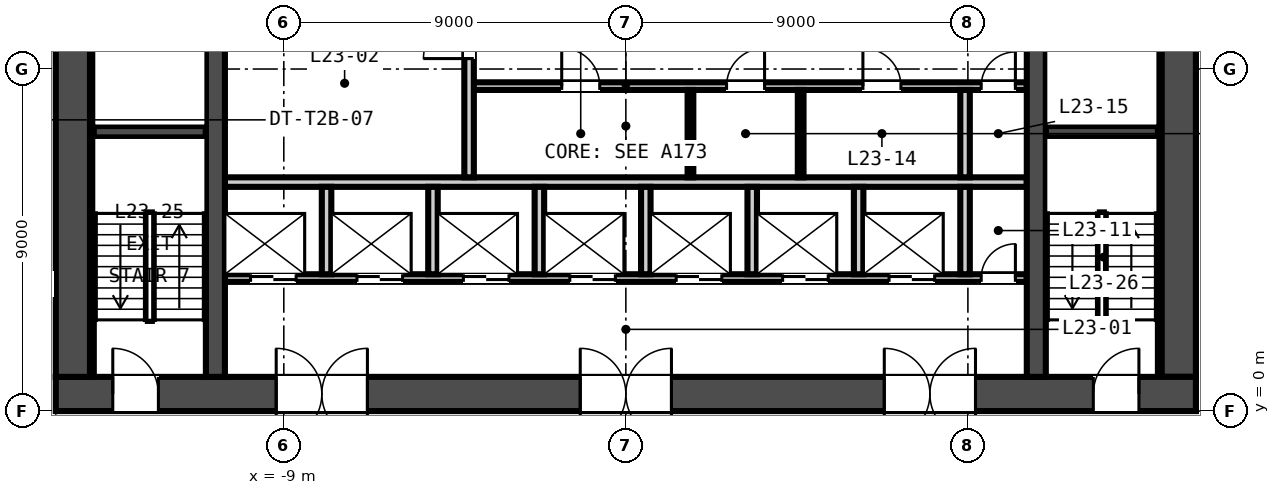
"""IFC4 building model, lengths in metres.
Left out: names, types, materials, properties, quantities, classifications, styles, units other than length and angle.
Written with IfcOpenShell. Run it as: python <this file> out.ifc"""

import sys

from ifc_helpers import new_model, si_unit, direction, frame, frame_2d, origin, place, context, subcontext, project, spatial, rectangle, extrude, element, fill, save


model = new_model("IFC4")
c1 = context("Model", 3, precision=1e-05, world=origin(), true_north=direction((0.0, 1.0)))
c2 = subcontext(c1, "Body", "Model", "MODEL_VIEW")
j1 = project(units=[si_unit("LENGTHUNIT", "METRE"), si_unit("PLANEANGLEUNIT", "RADIAN")], contexts=[c1])
p1 = place(None, origin())
s1 = spatial("IfcSite", under=j1, at=p1, CompositionType="ELEMENT")
p2 = place(p1, origin())
s2 = spatial("IfcBuilding", under=s1, at=p2, CompositionType="ELEMENT")
p3 = place(p2, frame((0.0, 0.0, 98.9)))
s3 = spatial("IfcBuildingStorey", under=s2, at=p3, CompositionType="ELEMENT", Elevation=98.9)
p4 = place(p3, frame((-15.0, 0.45, -0.15), z_axis=(0.0, 0.0, 1.0), x_axis=(1.0, 0.0, 0.0)))
e1 = element("IfcWall", 1, at=p4, inside=s3, PredefinedType="SOLIDWALL", context=c2, shape_type="SweptSolid", body=[
    extrude(rectangle(XDim=30.0, YDim=0.9, at=frame_2d((15.0, 0.0))), origin(), (0.0, 0.0, 1.0), 3.65),
])
p5 = place(p4, frame((5.8, 0.0, 0.15)))
e2 = element("IfcOpeningElement", 2, at=p5, cuts=e1, PredefinedType="OPENING", context=c2, shape_type="SweptSolid", body=[
    extrude(rectangle(XDim=2.4, YDim=2.4, at=frame_2d((1.2, 1.2))), frame((0.0, 0.46, 0.0), z_axis=(0.0, -1.0, 0.0), x_axis=(1.0, 0.0, 0.0)), (0.0, 0.0, 1.0), 0.92),
])
p6 = place(p4, frame((13.8, 0.0, 0.15)))
e3 = element("IfcOpeningElement", 3, at=p6, cuts=e1, PredefinedType="OPENING", context=c2, shape_type="SweptSolid", body=[
    extrude(rectangle(XDim=2.4, YDim=2.4, at=frame_2d((1.2, 1.2))), frame((0.0, 0.46, 0.0), z_axis=(0.0, -1.0, 0.0), x_axis=(1.0, 0.0, 0.0)), (0.0, 0.0, 1.0), 0.92),
])
p7 = place(p4, frame((21.8, 0.0, 0.15)))
e4 = element("IfcOpeningElement", 4, at=p7, cuts=e1, PredefinedType="OPENING", context=c2, shape_type="SweptSolid", body=[
    extrude(rectangle(XDim=2.4, YDim=2.4, at=frame_2d((1.2, 1.2))), frame((0.0, 0.46, 0.0), z_axis=(0.0, -1.0, 0.0), x_axis=(1.0, 0.0, 0.0)), (0.0, 0.0, 1.0), 0.92),
])
p8 = place(p4, frame((1.5, 0.0, 0.15)))
e5 = element("IfcOpeningElement", 5, at=p8, cuts=e1, PredefinedType="OPENING", context=c2, shape_type="SweptSolid", body=[
    extrude(rectangle(XDim=1.2, YDim=2.1, at=frame_2d((0.6, 1.05))), frame((0.0, 0.46, 0.0), z_axis=(0.0, -1.0, 0.0), x_axis=(1.0, 0.0, 0.0)), (0.0, 0.0, 1.0), 0.92),
])
p9 = place(p4, frame((27.3, 0.0, 0.15)))
e6 = element("IfcOpeningElement", 6, at=p9, cuts=e1, PredefinedType="OPENING", context=c2, shape_type="SweptSolid", body=[
    extrude(rectangle(XDim=1.2, YDim=2.1, at=frame_2d((0.6, 1.05))), frame((0.0, 0.46, 0.0), z_axis=(0.0, -1.0, 0.0), x_axis=(1.0, 0.0, 0.0)), (0.0, 0.0, 1.0), 0.92),
])
for number, where, z_axis, x_axis in (
    (7, (-14.55, 0.9, -0.15), (0.0, 0.0, 1.0), (0.0, 1.0, 0.0)),
    (8, (14.55, 0.9, -0.15), (0.0, 0.0, 1.0), (0.0, 1.0, 0.0)),
):
    element("IfcWall", number, at=place(p3, frame(where, z_axis=z_axis, x_axis=x_axis)), inside=s3, PredefinedType="SOLIDWALL", context=c2, shape_type="SweptSolid", body=[
        extrude(rectangle(XDim=13.2, YDim=0.9, at=frame_2d((6.6, 0.0))), origin(), (0.0, 0.0, 1.0), 3.65),
    ])
for number, where, z_axis, x_axis in (
    (9, (-10.8, 0.9, -0.15), (0.0, 0.0, 1.0), (0.0, 1.0, 0.0)),
    (10, (10.8, 0.9, -0.15), (0.0, 0.0, 1.0), (0.0, 1.0, 0.0)),
):
    element("IfcWall", number, at=place(p3, frame(where, z_axis=z_axis, x_axis=x_axis)), inside=s3, PredefinedType="SOLIDWALL", context=c2, shape_type="SweptSolid", body=[
        extrude(rectangle(XDim=13.2, YDim=0.5, at=frame_2d((6.6, 0.0))), origin(), (0.0, 0.0, 1.0), 3.65),
    ])
p10 = place(p3, frame((-10.55, 3.5, 0.0), z_axis=(0.0, 0.0, 1.0), x_axis=(1.0, 0.0, 0.0)))
e11 = element("IfcWall", 11, at=p10, inside=s3, PredefinedType="PARTITIONING", context=c2, shape_type="SweptSolid", body=[
    extrude(rectangle(XDim=21.1, YDim=0.2, at=frame_2d((10.55, 0.0))), origin(), (0.0, 0.0, 1.0), 3.5),
])
p11 = place(p10, frame((0.675, 0.0, 0.0)))
e12 = element("IfcOpeningElement", 12, at=p11, cuts=e11, PredefinedType="OPENING", context=c2, shape_type="SweptSolid", body=[
    extrude(rectangle(XDim=1.2, YDim=2.1, at=frame_2d((0.6, 1.05))), frame((0.0, 0.11, 0.0), z_axis=(0.0, -1.0, 0.0), x_axis=(1.0, 0.0, 0.0)), (0.0, 0.0, 1.0), 0.22),
])
p12 = place(p10, frame((3.475, 0.0, 0.0)))
e13 = element("IfcOpeningElement", 13, at=p12, cuts=e11, PredefinedType="OPENING", context=c2, shape_type="SweptSolid", body=[
    extrude(rectangle(XDim=1.2, YDim=2.1, at=frame_2d((0.6, 1.05))), frame((0.0, 0.11, 0.0), z_axis=(0.0, -1.0, 0.0), x_axis=(1.0, 0.0, 0.0)), (0.0, 0.0, 1.0), 0.22),
])
p13 = place(p10, frame((6.275, 0.0, 0.0)))
e14 = element("IfcOpeningElement", 14, at=p13, cuts=e11, PredefinedType="OPENING", context=c2, shape_type="SweptSolid", body=[
    extrude(rectangle(XDim=1.2, YDim=2.1, at=frame_2d((0.6, 1.05))), frame((0.0, 0.11, 0.0), z_axis=(0.0, -1.0, 0.0), x_axis=(1.0, 0.0, 0.0)), (0.0, 0.0, 1.0), 0.22),
])
p14 = place(p10, frame((9.075, 0.0, 0.0)))
e15 = element("IfcOpeningElement", 15, at=p14, cuts=e11, PredefinedType="OPENING", context=c2, shape_type="SweptSolid", body=[
    extrude(rectangle(XDim=1.2, YDim=2.1, at=frame_2d((0.6, 1.05))), frame((0.0, 0.11, 0.0), z_axis=(0.0, -1.0, 0.0), x_axis=(1.0, 0.0, 0.0)), (0.0, 0.0, 1.0), 0.22),
])
p15 = place(p10, frame((11.875, 0.0, 0.0)))
e16 = element("IfcOpeningElement", 16, at=p15, cuts=e11, PredefinedType="OPENING", context=c2, shape_type="SweptSolid", body=[
    extrude(rectangle(XDim=1.2, YDim=2.1, at=frame_2d((0.6, 1.05))), frame((0.0, 0.11, 0.0), z_axis=(0.0, -1.0, 0.0), x_axis=(1.0, 0.0, 0.0)), (0.0, 0.0, 1.0), 0.22),
])
p16 = place(p10, frame((14.675, 0.0, 0.0)))
e17 = element("IfcOpeningElement", 17, at=p16, cuts=e11, PredefinedType="OPENING", context=c2, shape_type="SweptSolid", body=[
    extrude(rectangle(XDim=1.2, YDim=2.1, at=frame_2d((0.6, 1.05))), frame((0.0, 0.11, 0.0), z_axis=(0.0, -1.0, 0.0), x_axis=(1.0, 0.0, 0.0)), (0.0, 0.0, 1.0), 0.22),
])
p17 = place(p10, frame((17.475, 0.0, 0.0)))
e18 = element("IfcOpeningElement", 18, at=p17, cuts=e11, PredefinedType="OPENING", context=c2, shape_type="SweptSolid", body=[
    extrude(rectangle(XDim=1.2, YDim=2.1, at=frame_2d((0.6, 1.05))), frame((0.0, 0.11, 0.0), z_axis=(0.0, -1.0, 0.0), x_axis=(1.0, 0.0, 0.0)), (0.0, 0.0, 1.0), 0.22),
])
p18 = place(p10, frame((19.9, 0.0, 0.0)))
e19 = element("IfcOpeningElement", 19, at=p18, cuts=e11, PredefinedType="OPENING", context=c2, shape_type="SweptSolid", body=[
    extrude(rectangle(XDim=0.9, YDim=2.1, at=frame_2d((0.45, 1.05))), frame((0.0, 0.11, 0.0), z_axis=(0.0, -1.0, 0.0), x_axis=(1.0, 0.0, 0.0)), (0.0, 0.0, 1.0), 0.22),
])
p19 = place(p3, frame((-10.55, 6.025, 0.0), z_axis=(0.0, 0.0, 1.0), x_axis=(1.0, 0.0, 0.0)))
e20 = element("IfcWall", 20, at=p19, inside=s3, PredefinedType="PARTITIONING", context=c2, shape_type="SweptSolid", body=[
    extrude(rectangle(XDim=21.1, YDim=0.25, at=frame_2d((10.55, 0.0))), origin(), (0.0, 0.0, 1.0), 3.5),
])
p20 = place(p3, frame((-4.125, 8.55, 0.0), z_axis=(0.0, 0.0, 1.0), x_axis=(1.0, 0.0, 0.0)))
e21 = element("IfcWall", 21, at=p20, inside=s3, PredefinedType="PARTITIONING", context=c2, shape_type="SweptSolid", body=[
    extrude(rectangle(XDim=14.675, YDim=0.2, at=frame_2d((7.337, 0.0))), origin(), (0.0, 0.0, 1.0), 3.5),
])
p21 = place(p20, frame((2.438, 0.0, 0.0)))
e22 = element("IfcOpeningElement", 22, at=p21, cuts=e21, PredefinedType="OPENING", context=c2, shape_type="SweptSolid", body=[
    extrude(rectangle(XDim=1.0, YDim=2.1, at=frame_2d((0.5, 1.05))), frame((0.0, 0.11, 0.0), z_axis=(0.0, -1.0, 0.0), x_axis=(1.0, 0.0, 0.0)), (0.0, 0.0, 1.0), 0.22),
])
p22 = place(p20, frame((6.775, 0.0, 0.0)))
e23 = element("IfcOpeningElement", 23, at=p22, cuts=e21, PredefinedType="OPENING", context=c2, shape_type="SweptSolid", body=[
    extrude(rectangle(XDim=1.0, YDim=2.1, at=frame_2d((0.5, 1.05))), frame((0.0, 0.11, 0.0), z_axis=(0.0, -1.0, 0.0), x_axis=(1.0, 0.0, 0.0)), (0.0, 0.0, 1.0), 0.22),
])
p23 = place(p20, frame((10.363, 0.0, 0.0)))
e24 = element("IfcOpeningElement", 24, at=p23, cuts=e21, PredefinedType="OPENING", context=c2, shape_type="SweptSolid", body=[
    extrude(rectangle(XDim=1.0, YDim=2.1, at=frame_2d((0.5, 1.05))), frame((0.0, 0.11, 0.0), z_axis=(0.0, -1.0, 0.0), x_axis=(1.0, 0.0, 0.0)), (0.0, 0.0, 1.0), 0.22),
])
p24 = place(p20, frame((13.475, 0.0, 0.0)))
e25 = element("IfcOpeningElement", 25, at=p24, cuts=e21, PredefinedType="OPENING", context=c2, shape_type="SweptSolid", body=[
    extrude(rectangle(XDim=0.9, YDim=2.1, at=frame_2d((0.45, 1.05))), frame((0.0, 0.11, 0.0), z_axis=(0.0, -1.0, 0.0), x_axis=(1.0, 0.0, 0.0)), (0.0, 0.0, 1.0), 0.22),
])
p25 = place(p3, frame((-4.125, 6.15, 0.0), z_axis=(0.0, 0.0, 1.0), x_axis=(0.0, 1.0, 0.0)))
e26 = element("IfcWall", 26, at=p25, inside=s3, PredefinedType="PARTITIONING", context=c2, shape_type="SweptSolid", body=[
    extrude(rectangle(XDim=4.95, YDim=0.25, at=frame_2d((2.475, 0.0))), origin(), (0.0, 0.0, 1.0), 3.5),
])
p26 = place(p25, frame((3.125, 0.0, 0.0)))
e27 = element("IfcOpeningElement", 27, at=p26, cuts=e26, PredefinedType="OPENING", context=c2, shape_type="SweptSolid", body=[
    extrude(rectangle(XDim=1.2, YDim=2.1, at=frame_2d((0.6, 1.05))), frame((0.0, 0.135, 0.0), z_axis=(0.0, -1.0, 0.0), x_axis=(1.0, 0.0, 0.0)), (0.0, 0.0, 1.0), 0.27),
])
for number, where, z_axis, x_axis in (
    (28, (-7.875, 3.6, 0.0), (0.0, 0.0, 1.0), (0.0, 1.0, 0.0)),
    (29, (-5.075, 3.6, 0.0), (0.0, 0.0, 1.0), (0.0, 1.0, 0.0)),
    (30, (-2.275, 3.6, 0.0), (0.0, 0.0, 1.0), (0.0, 1.0, 0.0)),
    (31, (0.525, 3.6, 0.0), (0.0, 0.0, 1.0), (0.0, 1.0, 0.0)),
    (32, (3.325, 3.6, 0.0), (0.0, 0.0, 1.0), (0.0, 1.0, 0.0)),
    (33, (6.125, 3.6, 0.0), (0.0, 0.0, 1.0), (0.0, 1.0, 0.0)),
    (34, (8.925, 3.6, 0.0), (0.0, 0.0, 1.0), (0.0, 1.0, 0.0)),
):
    element("IfcWall", number, at=place(p3, frame(where, z_axis=z_axis, x_axis=x_axis)), inside=s3, PredefinedType="PARTITIONING", context=c2, shape_type="SweptSolid", body=[
        extrude(rectangle(XDim=2.3, YDim=0.25, at=frame_2d((1.15, 0.0))), origin(), (0.0, 0.0, 1.0), 3.5),
    ])
for number, where, z_axis, x_axis in (
    (35, (1.7, 6.15, 0.0), (0.0, 0.0, 1.0), (0.0, 1.0, 0.0)),
    (36, (4.6, 6.15, 0.0), (0.0, 0.0, 1.0), (0.0, 1.0, 0.0)),
):
    element("IfcWall", number, at=place(p3, frame(where, z_axis=z_axis, x_axis=x_axis)), inside=s3, PredefinedType="PARTITIONING", context=c2, shape_type="SweptSolid", body=[
        extrude(rectangle(XDim=2.3, YDim=0.15, at=frame_2d((1.15, 0.0))), origin(), (0.0, 0.0, 1.0), 3.5),
    ])
p27 = place(p3, frame((8.925, 6.15, 0.0), z_axis=(0.0, 0.0, 1.0), x_axis=(0.0, 1.0, 0.0)))
e37 = element("IfcWall", 37, at=p27, inside=s3, PredefinedType="PARTITIONING", context=c2, shape_type="SweptSolid", body=[
    extrude(rectangle(XDim=2.3, YDim=0.25, at=frame_2d((1.15, 0.0))), origin(), (0.0, 0.0, 1.0), 3.5),
])
p28 = place(p3, frame((-14.0, 7.35, 0.0), z_axis=(0.0, 0.0, 1.0), x_axis=(1.0, 0.0, 0.0)))
e38 = element("IfcWall", 38, at=p28, inside=s3, PredefinedType="SOLIDWALL", context=c2, shape_type="SweptSolid", body=[
    extrude(rectangle(XDim=2.95, YDim=0.3, at=frame_2d((1.475, 0.0))), origin(), (0.0, 0.0, 1.0), 3.5),
])
p29 = place(p3, frame((-14.05, 0.9, 0.0), z_axis=(0.0, 0.0, 1.0), x_axis=(0.0, 1.0, 0.0)))
e39 = element("IfcWall", 39, at=p29, inside=s3, PredefinedType="SOLIDWALL", context=c2, shape_type="SweptSolid", body=[
    extrude(rectangle(XDim=13.2, YDim=0.1, at=frame_2d((6.6, 0.0))), origin(), (0.0, 0.0, 1.0), 3.5),
])
p30 = place(p3, frame((11.05, 7.35, 0.0), z_axis=(0.0, 0.0, 1.0), x_axis=(1.0, 0.0, 0.0)))
e40 = element("IfcWall", 40, at=p30, inside=s3, PredefinedType="SOLIDWALL", context=c2, shape_type="SweptSolid", body=[
    extrude(rectangle(XDim=2.95, YDim=0.3, at=frame_2d((1.475, 0.0))), origin(), (0.0, 0.0, 1.0), 3.5),
])
p31 = place(p3, frame((14.05, 0.9, 0.0), z_axis=(0.0, 0.0, 1.0), x_axis=(0.0, 1.0, 0.0)))
e41 = element("IfcWall", 41, at=p31, inside=s3, PredefinedType="SOLIDWALL", context=c2, shape_type="SweptSolid", body=[
    extrude(rectangle(XDim=13.2, YDim=0.1, at=frame_2d((6.6, 0.0))), origin(), (0.0, 0.0, 1.0), 3.5),
])
p32 = place(p26, origin())
e42 = element("IfcDoor", 42, at=p32, inside=s3, OperationType="SINGLE_SWING_LEFT", PredefinedType="DOOR", context=c2, shape_type="SweptSolid", body=[
    extrude(rectangle(XDim=1.2, YDim=2.1, at=frame_2d((0.6, 1.05))), frame((0.0, 0.025, 0.0), z_axis=(0.0, -1.0, 0.0), x_axis=(1.0, 0.0, 0.0)), (0.0, 0.0, 1.0), 0.05),
])
fill(e27, e42)
p33 = place(p11, origin())
e43 = element("IfcDoor", 43, at=p33, inside=s3, OperationType="DOUBLE_DOOR_SLIDING", PredefinedType="DOOR", context=c2, shape_type="SweptSolid", body=[
    extrude(rectangle(XDim=1.2, YDim=2.1, at=frame_2d((0.6, 1.05))), frame((0.0, 0.025, 0.0), z_axis=(0.0, -1.0, 0.0), x_axis=(1.0, 0.0, 0.0)), (0.0, 0.0, 1.0), 0.05),
])
fill(e12, e43)
p34 = place(p12, origin())
e44 = element("IfcDoor", 44, at=p34, inside=s3, OperationType="DOUBLE_DOOR_SLIDING", PredefinedType="DOOR", context=c2, shape_type="SweptSolid", body=[
    extrude(rectangle(XDim=1.2, YDim=2.1, at=frame_2d((0.6, 1.05))), frame((0.0, 0.025, 0.0), z_axis=(0.0, -1.0, 0.0), x_axis=(1.0, 0.0, 0.0)), (0.0, 0.0, 1.0), 0.05),
])
fill(e13, e44)
p35 = place(p13, origin())
e45 = element("IfcDoor", 45, at=p35, inside=s3, OperationType="DOUBLE_DOOR_SLIDING", PredefinedType="DOOR", context=c2, shape_type="SweptSolid", body=[
    extrude(rectangle(XDim=1.2, YDim=2.1, at=frame_2d((0.6, 1.05))), frame((0.0, 0.025, 0.0), z_axis=(0.0, -1.0, 0.0), x_axis=(1.0, 0.0, 0.0)), (0.0, 0.0, 1.0), 0.05),
])
fill(e14, e45)
p36 = place(p14, origin())
e46 = element("IfcDoor", 46, at=p36, inside=s3, OperationType="DOUBLE_DOOR_SLIDING", PredefinedType="DOOR", context=c2, shape_type="SweptSolid", body=[
    extrude(rectangle(XDim=1.2, YDim=2.1, at=frame_2d((0.6, 1.05))), frame((0.0, 0.025, 0.0), z_axis=(0.0, -1.0, 0.0), x_axis=(1.0, 0.0, 0.0)), (0.0, 0.0, 1.0), 0.05),
])
fill(e15, e46)
p37 = place(p15, origin())
e47 = element("IfcDoor", 47, at=p37, inside=s3, OperationType="DOUBLE_DOOR_SLIDING", PredefinedType="DOOR", context=c2, shape_type="SweptSolid", body=[
    extrude(rectangle(XDim=1.2, YDim=2.1, at=frame_2d((0.6, 1.05))), frame((0.0, 0.025, 0.0), z_axis=(0.0, -1.0, 0.0), x_axis=(1.0, 0.0, 0.0)), (0.0, 0.0, 1.0), 0.05),
])
fill(e16, e47)
p38 = place(p16, origin())
e48 = element("IfcDoor", 48, at=p38, inside=s3, OperationType="DOUBLE_DOOR_SLIDING", PredefinedType="DOOR", context=c2, shape_type="SweptSolid", body=[
    extrude(rectangle(XDim=1.2, YDim=2.1, at=frame_2d((0.6, 1.05))), frame((0.0, 0.025, 0.0), z_axis=(0.0, -1.0, 0.0), x_axis=(1.0, 0.0, 0.0)), (0.0, 0.0, 1.0), 0.05),
])
fill(e17, e48)
p39 = place(p17, origin())
e49 = element("IfcDoor", 49, at=p39, inside=s3, OperationType="DOUBLE_DOOR_SLIDING", PredefinedType="DOOR", context=c2, shape_type="SweptSolid", body=[
    extrude(rectangle(XDim=1.2, YDim=2.1, at=frame_2d((0.6, 1.05))), frame((0.0, 0.025, 0.0), z_axis=(0.0, -1.0, 0.0), x_axis=(1.0, 0.0, 0.0)), (0.0, 0.0, 1.0), 0.05),
])
fill(e18, e49)
p40 = place(p18, origin())
e50 = element("IfcDoor", 50, at=p40, inside=s3, OperationType="SINGLE_SWING_RIGHT", PredefinedType="DOOR", context=c2, shape_type="SweptSolid", body=[
    extrude(rectangle(XDim=0.9, YDim=2.1, at=frame_2d((0.45, 1.05))), frame((0.0, 0.025, 0.0), z_axis=(0.0, -1.0, 0.0), x_axis=(1.0, 0.0, 0.0)), (0.0, 0.0, 1.0), 0.05),
])
fill(e19, e50)
p41 = place(p21, origin())
e51 = element("IfcDoor", 51, at=p41, inside=s3, OperationType="SINGLE_SWING_LEFT", PredefinedType="DOOR", context=c2, shape_type="SweptSolid", body=[
    extrude(rectangle(XDim=1.0, YDim=2.1, at=frame_2d((0.5, 1.05))), frame((0.0, 0.025, 0.0), z_axis=(0.0, -1.0, 0.0), x_axis=(1.0, 0.0, 0.0)), (0.0, 0.0, 1.0), 0.05),
])
fill(e22, e51)
p42 = place(p22, origin())
e52 = element("IfcDoor", 52, at=p42, inside=s3, OperationType="SINGLE_SWING_RIGHT", PredefinedType="DOOR", context=c2, shape_type="SweptSolid", body=[
    extrude(rectangle(XDim=1.0, YDim=2.1, at=frame_2d((0.5, 1.05))), frame((0.0, 0.025, 0.0), z_axis=(0.0, -1.0, 0.0), x_axis=(1.0, 0.0, 0.0)), (0.0, 0.0, 1.0), 0.05),
])
fill(e23, e52)
p43 = place(p23, origin())
e53 = element("IfcDoor", 53, at=p43, inside=s3, OperationType="SINGLE_SWING_LEFT", PredefinedType="DOOR", context=c2, shape_type="SweptSolid", body=[
    extrude(rectangle(XDim=1.0, YDim=2.1, at=frame_2d((0.5, 1.05))), frame((0.0, 0.025, 0.0), z_axis=(0.0, -1.0, 0.0), x_axis=(1.0, 0.0, 0.0)), (0.0, 0.0, 1.0), 0.05),
])
fill(e24, e53)
p44 = place(p24, origin())
e54 = element("IfcDoor", 54, at=p44, inside=s3, OperationType="SINGLE_SWING_RIGHT", PredefinedType="DOOR", context=c2, shape_type="SweptSolid", body=[
    extrude(rectangle(XDim=0.9, YDim=2.1, at=frame_2d((0.45, 1.05))), frame((0.0, 0.025, 0.0), z_axis=(0.0, -1.0, 0.0), x_axis=(1.0, 0.0, 0.0)), (0.0, 0.0, 1.0), 0.05),
])
fill(e25, e54)
p45 = place(p5, origin())
e55 = element("IfcDoor", 55, at=p45, inside=s3, OperationType="DOUBLE_DOOR_DOUBLE_SWING", PredefinedType="DOOR", context=c2, shape_type="SweptSolid", body=[
    extrude(rectangle(XDim=2.4, YDim=2.4, at=frame_2d((1.2, 1.2))), frame((0.0, 0.025, 0.0), z_axis=(0.0, -1.0, 0.0), x_axis=(1.0, 0.0, 0.0)), (0.0, 0.0, 1.0), 0.05),
])
fill(e2, e55)
p46 = place(p6, origin())
e56 = element("IfcDoor", 56, at=p46, inside=s3, OperationType="DOUBLE_DOOR_DOUBLE_SWING", PredefinedType="DOOR", context=c2, shape_type="SweptSolid", body=[
    extrude(rectangle(XDim=2.4, YDim=2.4, at=frame_2d((1.2, 1.2))), frame((0.0, 0.025, 0.0), z_axis=(0.0, -1.0, 0.0), x_axis=(1.0, 0.0, 0.0)), (0.0, 0.0, 1.0), 0.05),
])
fill(e3, e56)
p47 = place(p7, origin())
e57 = element("IfcDoor", 57, at=p47, inside=s3, OperationType="DOUBLE_DOOR_DOUBLE_SWING", PredefinedType="DOOR", context=c2, shape_type="SweptSolid", body=[
    extrude(rectangle(XDim=2.4, YDim=2.4, at=frame_2d((1.2, 1.2))), frame((0.0, 0.025, 0.0), z_axis=(0.0, -1.0, 0.0), x_axis=(1.0, 0.0, 0.0)), (0.0, 0.0, 1.0), 0.05),
])
fill(e4, e57)
p48 = place(p8, origin())
e58 = element("IfcDoor", 58, at=p48, inside=s3, OperationType="SINGLE_SWING_LEFT", PredefinedType="DOOR", context=c2, shape_type="SweptSolid", body=[
    extrude(rectangle(XDim=1.2, YDim=2.1, at=frame_2d((0.6, 1.05))), frame((0.0, 0.025, 0.0), z_axis=(0.0, -1.0, 0.0), x_axis=(1.0, 0.0, 0.0)), (0.0, 0.0, 1.0), 0.05),
])
fill(e5, e58)
p49 = place(p9, origin())
e59 = element("IfcDoor", 59, at=p49, inside=s3, OperationType="SINGLE_SWING_RIGHT", PredefinedType="DOOR", context=c2, shape_type="SweptSolid", body=[
    extrude(rectangle(XDim=1.2, YDim=2.1, at=frame_2d((0.6, 1.05))), frame((0.0, 0.025, 0.0), z_axis=(0.0, -1.0, 0.0), x_axis=(1.0, 0.0, 0.0)), (0.0, 0.0, 1.0), 0.05),
])
fill(e6, e59)
save(model, sys.argv[1])
